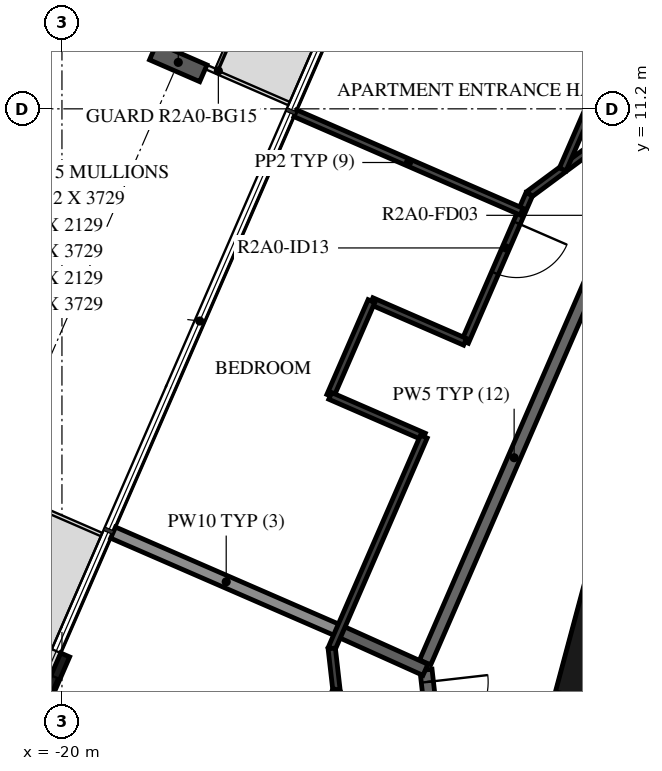
"""IFC4 building model, lengths in metres.
Left out: names, types, materials, properties, quantities, classifications, styles, units other than length and angle.
Written with IfcOpenShell. Run it as: python <this file> out.ifc"""

import sys

from ifc_helpers import new_model, si_unit, direction, frame, frame_2d, origin, origin_2d, place, context, subcontext, project, spatial, rectangle, i_section, extrude, element, fill, save


model = new_model("IFC4")
c1 = context("Model", 3, precision=1e-05, world=origin(), true_north=direction((0.0, 1.0)))
c2 = subcontext(c1, "Body", "Model", "MODEL_VIEW")
j1 = project(units=[si_unit("LENGTHUNIT", "METRE"), si_unit("PLANEANGLEUNIT", "RADIAN")], contexts=[c1])
p1 = place(None, origin())
s1 = spatial("IfcSite", under=j1, at=p1, CompositionType="ELEMENT")
p2 = place(p1, origin())
s2 = spatial("IfcBuilding", under=s1, at=p2, CompositionType="ELEMENT")
p3 = place(p2, frame((0.0, 0.0, 83.7)))
s3 = spatial("IfcBuildingStorey", under=s2, at=p3, CompositionType="ELEMENT", Elevation=83.7)
p4 = place(p3, frame((-18.087, 11.964, -0.38), z_axis=(0.0, 0.0, 1.0), x_axis=(0.398749038162, 0.917060087761, 0.0)))
e1 = element("IfcColumn", 1, at=p4, inside=s3, PredefinedType="COLUMN", context=c2, shape_type="SweptSolid", body=[
    extrude(i_section(OverallWidth=0.3, OverallDepth=0.9, WebThickness=0.019, FlangeThickness=0.035, FilletRadius=0.03, at=origin_2d()), origin(), (0.0, 0.0, 1.0), 3.5),
])
p5 = place(p3, frame((-19.947, 2.219, 0.0), z_axis=(0.0, 0.0, 1.0), x_axis=(-0.398784695066, -0.917044582876, 0.0)))
e2 = element("IfcWall", 2, at=p5, inside=s3, PredefinedType="STANDARD", context=c2, shape_type="SweptSolid", body=[
    extrude(rectangle(XDim=3.2, YDim=0.16, at=frame_2d((1.6, 0.0))), origin(), (0.0, 0.0, 1.0), 3.12),
])
p6 = place(p5, frame((0.4, 0.0, 0.0)))
e3 = element("IfcOpeningElement", 3, at=p6, cuts=e2, PredefinedType="OPENING", context=c2, shape_type="SweptSolid", body=[
    extrude(rectangle(XDim=2.4, YDim=2.4, at=frame_2d((1.2, 1.2))), frame((0.0, 0.09, 0.0), z_axis=(0.0, -1.0, 0.0), x_axis=(1.0, 0.0, 0.0)), (0.0, 0.0, 1.0), 0.18),
])
p7 = place(p3, frame((-10.858, 4.479, 0.0), z_axis=(0.0, 0.0, 1.0), x_axis=(-0.258734743916, -0.965948410781, 0.0)))
e4 = element("IfcWall", 4, at=p7, inside=s3, PredefinedType="SHEAR", context=c2, shape_type="SweptSolid", body=[
    extrude(rectangle(XDim=3.033, YDim=0.5, at=frame_2d((1.516, 0.0))), origin(), (0.0, 0.0, 1.0), 3.12),
])
p8 = place(p3, frame((-11.1, 8.829, 0.0), z_axis=(0.0, 0.0, 1.0), x_axis=(-0.398741918631, -0.917063183388, 0.0)))
e5 = element("IfcWall", 5, at=p8, inside=s3, PredefinedType="STANDARD", context=c2, shape_type="SweptSolid", body=[
    extrude(rectangle(XDim=7.342, YDim=0.2, at=frame_2d((3.671, 0.0))), origin(), (0.0, 0.0, 1.0), 3.12),
])
p9 = place(p3, frame((-14.013, 1.974, 0.0), z_axis=(0.0, 0.0, 1.0), x_axis=(0.113196526349, -0.993572617589, 0.0)))
e6 = element("IfcWall", 6, at=p9, inside=s3, PredefinedType="STANDARD", context=c2, shape_type="SweptSolid", body=[
    extrude(rectangle(XDim=7.219, YDim=0.2, at=frame_2d((3.609, 0.0))), origin(), (0.0, 0.0, 1.0), 3.12),
])
p10 = place(p9, frame((0.2, 0.0, 0.0)))
e7 = element("IfcOpeningElement", 7, at=p10, cuts=e6, PredefinedType="OPENING", context=c2, shape_type="SweptSolid", body=[
    extrude(rectangle(XDim=1.0, YDim=2.1, at=frame_2d((0.5, 1.05))), frame((0.0, 0.11, 0.0), z_axis=(0.0, -1.0, 0.0), x_axis=(1.0, 0.0, 0.0)), (0.0, 0.0, 1.0), 0.22),
])
p11 = place(p3, frame((-15.439, 2.613, 0.0), z_axis=(0.0, 0.0, 1.0), x_axis=(0.911830308819, -0.410567275752, 0.0)))
e8 = element("IfcWall", 8, at=p11, inside=s3, PredefinedType="STANDARD", context=c2, shape_type="SweptSolid", body=[
    extrude(rectangle(XDim=1.553, YDim=0.2, at=frame_2d((0.777, 0.0))), origin(), (0.0, 0.0, 1.0), 3.12),
])
p12 = place(p3, frame((-19.159, 4.231, 0.0), z_axis=(0.0, 0.0, 1.0), x_axis=(0.91704996524, -0.398772317562, 0.0)))
e9 = element("IfcWall", 9, at=p12, inside=s3, PredefinedType="STANDARD", context=c2, shape_type="SweptSolid", body=[
    extrude(rectangle(XDim=4.057, YDim=0.2, at=frame_2d((2.029, 0.0))), origin(), (0.0, 0.0, 1.0), 2.73),
])
p13 = place(p3, frame((-5.767, 14.641, 0.0), z_axis=(0.0, 0.0, 1.0), x_axis=(-0.803853364238, -0.594827511807, 0.0)))
e10 = element("IfcWall", 10, at=p13, inside=s3, PredefinedType="PARTITIONING", context=c2, shape_type="SweptSolid", body=[
    extrude(rectangle(XDim=8.146, YDim=0.12, at=frame_2d((4.073, 0.0))), origin(), (0.0, 0.0, 1.0), 3.12),
])
p14 = place(p13, frame((0.97, 0.0, 0.0)))
e11 = element("IfcOpeningElement", 11, at=p14, cuts=e10, PredefinedType="OPENING", context=c2, shape_type="SweptSolid", body=[
    extrude(rectangle(XDim=0.8, YDim=2.1, at=frame_2d((0.4, 1.05))), frame((0.0, 0.07, 0.0), z_axis=(0.0, -1.0, 0.0), x_axis=(1.0, 0.0, 0.0)), (0.0, 0.0, 1.0), 0.14),
])
p15 = place(p3, frame((-12.315, 9.796, 0.0), z_axis=(0.0, 0.0, 1.0), x_axis=(-0.398790200406, -0.917042188812, 0.0)))
e12 = element("IfcWall", 12, at=p15, inside=s3, PredefinedType="PARTITIONING", context=c2, shape_type="SweptSolid", body=[
    extrude(rectangle(XDim=2.646, YDim=0.12, at=frame_2d((1.323, 0.0))), origin(), (0.0, 0.0, 1.0), 3.12),
])
p16 = place(p15, frame((0.513, 0.0, 0.0)))
e13 = element("IfcOpeningElement", 13, at=p16, cuts=e12, PredefinedType="OPENING", context=c2, shape_type="SweptSolid", body=[
    extrude(rectangle(XDim=0.9, YDim=2.1, at=frame_2d((0.45, 1.05))), frame((0.0, 0.07, 0.0), z_axis=(0.0, -1.0, 0.0), x_axis=(1.0, 0.0, 0.0)), (0.0, 0.0, 1.0), 0.14),
])
p17 = place(p3, frame((-13.371, 7.369, 0.0), z_axis=(0.0, 0.0, 1.0), x_axis=(-0.917109358393, 0.398635704306, 0.0)))
e14 = element("IfcWall", 14, at=p17, inside=s3, PredefinedType="PARTITIONING", context=c2, shape_type="SweptSolid", body=[
    extrude(rectangle(XDim=1.679, YDim=0.12, at=frame_2d((0.839, 0.0))), origin(), (0.0, 0.0, 1.0), 3.12),
])
p18 = place(p3, frame((-14.91, 8.038, 0.0), z_axis=(0.0, 0.0, 1.0), x_axis=(-0.398715607479, -0.91707462311, 0.0)))
e15 = element("IfcWall", 15, at=p18, inside=s3, PredefinedType="PARTITIONING", context=c2, shape_type="SweptSolid", body=[
    extrude(rectangle(XDim=1.7, YDim=0.12, at=frame_2d((0.85, 0.0))), origin(), (0.0, 0.0, 1.0), 3.12),
])
p19 = place(p3, frame((-15.588, 6.479, 0.0), z_axis=(0.0, 0.0, 1.0), x_axis=(0.917033055073, -0.398811203332, 0.0)))
e16 = element("IfcWall", 16, at=p19, inside=s3, PredefinedType="PARTITIONING", context=c2, shape_type="SweptSolid", body=[
    extrude(rectangle(XDim=1.678, YDim=0.12, at=frame_2d((0.839, 0.0))), origin(), (0.0, 0.0, 1.0), 3.12),
])
p20 = place(p3, frame((-14.049, 5.81, 0.0), z_axis=(0.0, 0.0, 1.0), x_axis=(-0.398707311688, -0.917078229818, 0.0)))
e17 = element("IfcWall", 17, at=p20, inside=s3, PredefinedType="PARTITIONING", context=c2, shape_type="SweptSolid", body=[
    extrude(rectangle(XDim=3.799, YDim=0.12, at=frame_2d((1.899, 0.0))), origin(), (0.0, 0.0, 1.0), 3.12),
])
p21 = place(p3, frame((-5.952, 23.571, 0.0), z_axis=(0.0, 0.0, 1.0), x_axis=(-0.398745097158, -0.917061801348, 0.0)))
e18 = element("IfcWall", 18, at=p21, inside=s3, PredefinedType="PARTITIONING", context=c2, shape_type="SweptSolid", body=[
    extrude(rectangle(XDim=14.576, YDim=0.12, at=frame_2d((7.288, 0.0))), origin(), (0.0, 0.0, 1.0), 3.12),
])
p22 = place(p21, frame((2.801, 0.0, 0.0)))
e19 = element("IfcOpeningElement", 19, at=p22, cuts=e18, PredefinedType="OPENING", context=c2, shape_type="SweptSolid", body=[
    extrude(rectangle(XDim=0.9, YDim=2.1, at=frame_2d((0.45, 1.05))), frame((0.0, 0.07, 0.0), z_axis=(0.0, -1.0, 0.0), x_axis=(1.0, 0.0, 0.0)), (0.0, 0.0, 1.0), 0.14),
])
p23 = place(p21, frame((1.405, 0.0, 0.0)))
e20 = element("IfcOpeningElement", 20, at=p23, cuts=e18, PredefinedType="OPENING", context=c2, shape_type="SweptSolid", body=[
    extrude(rectangle(XDim=0.9, YDim=2.1, at=frame_2d((0.45, 1.05))), frame((0.0, 0.07, 0.0), z_axis=(0.0, -1.0, 0.0), x_axis=(1.0, 0.0, 0.0)), (0.0, 0.0, 1.0), 0.14),
])
p24 = place(p3, frame((-16.161, 11.126, 0.0), z_axis=(0.0, 0.0, 1.0), x_axis=(0.91705953326, -0.398750313425, 0.0)))
e21 = element("IfcWall", 21, at=p24, inside=s3, PredefinedType="PARTITIONING", context=c2, shape_type="SweptSolid", body=[
    extrude(rectangle(XDim=4.057, YDim=0.12, at=frame_2d((2.029, 0.0))), origin(), (0.0, 0.0, 1.0), 2.73),
])
p25 = place(p3, frame((-15.563, 2.326, 0.0), z_axis=(0.0, 0.0, 1.0), x_axis=(0.113013677091, -0.993593432341, 0.0)))
e22 = element("IfcWall", 22, at=p25, inside=s3, PredefinedType="PARTITIONING", context=c2, shape_type="SweptSolid", body=[
    extrude(rectangle(XDim=0.685, YDim=0.12, at=frame_2d((0.342, 0.0))), origin(), (0.0, 0.0, 1.0), 3.12),
])
p26 = place(p3, frame((-15.486, 1.646, 0.0), z_axis=(0.0, 0.0, 1.0), x_axis=(-0.398701933952, -0.917080567814, 0.0)))
e23 = element("IfcWall", 23, at=p26, inside=s3, PredefinedType="PARTITIONING", context=c2, shape_type="SweptSolid", body=[
    extrude(rectangle(XDim=0.739, YDim=0.12, at=frame_2d((0.369, 0.0))), origin(), (0.0, 0.0, 1.0), 3.12),
])
p27 = place(p6, origin())
e24 = element("IfcDoor", 24, at=p27, inside=s3, OperationType="DOUBLE_DOOR_SLIDING", PredefinedType="DOOR", context=c2, shape_type="SweptSolid", body=[
    extrude(rectangle(XDim=2.4, YDim=2.4, at=frame_2d((1.2, 1.2))), frame((0.0, 0.025, 0.0), z_axis=(0.0, -1.0, 0.0), x_axis=(1.0, 0.0, 0.0)), (0.0, 0.0, 1.0), 0.05),
])
fill(e3, e24)
p28 = place(p16, origin())
e25 = element("IfcDoor", 25, at=p28, inside=s3, OperationType="SINGLE_SWING_LEFT", PredefinedType="DOOR", context=c2, shape_type="SweptSolid", body=[
    extrude(rectangle(XDim=0.9, YDim=2.1, at=frame_2d((0.45, 1.05))), frame((0.0, 0.025, 0.0), z_axis=(0.0, -1.0, 0.0), x_axis=(1.0, 0.0, 0.0)), (0.0, 0.0, 1.0), 0.05),
])
fill(e13, e25)
p29 = place(p10, origin())
e26 = element("IfcDoor", 26, at=p29, inside=s3, OperationType="SINGLE_SWING_RIGHT", PredefinedType="DOOR", context=c2, shape_type="SweptSolid", body=[
    extrude(rectangle(XDim=1.0, YDim=2.1, at=frame_2d((0.5, 1.05))), frame((0.0, 0.025, 0.0), z_axis=(0.0, -1.0, 0.0), x_axis=(1.0, 0.0, 0.0)), (0.0, 0.0, 1.0), 0.05),
])
fill(e7, e26)
save(model, sys.argv[1])
